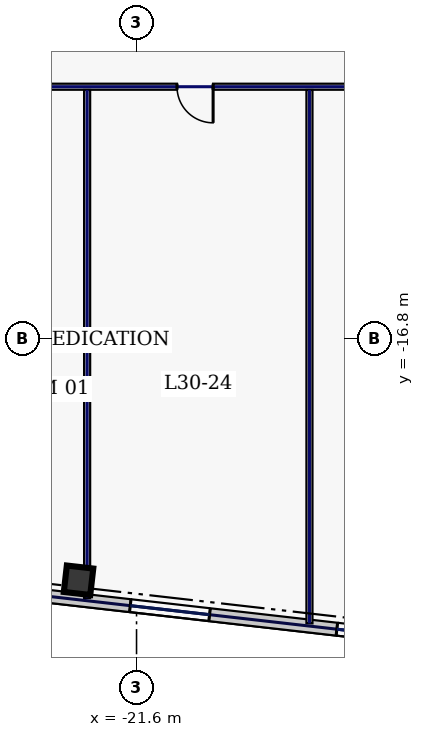
"""IFC4 building model, lengths in metres.
Left out: names, types, materials, properties, quantities, classifications, styles, units other than length and angle.
Written with IfcOpenShell. Run it as: python <this file> out.ifc"""

import sys

from ifc_helpers import new_model, si_unit, direction, frame, frame_2d, origin, origin_2d, place, context, subcontext, project, spatial, rectangle, hollow_rectangle, extrude, element, fill, save


model = new_model("IFC4")
c1 = context("Model", 3, precision=1e-05, world=origin(), true_north=direction((0.0, 1.0)))
c2 = subcontext(c1, "Body", "Model", "MODEL_VIEW")
j1 = project(units=[si_unit("LENGTHUNIT", "METRE"), si_unit("PLANEANGLEUNIT", "RADIAN")], contexts=[c1])
p1 = place(None, origin())
s1 = spatial("IfcSite", under=j1, at=p1, CompositionType="ELEMENT")
p2 = place(p1, origin())
s2 = spatial("IfcBuilding", under=s1, at=p2, CompositionType="ELEMENT")
p3 = place(p2, frame((0.0, 0.0, 133.4)))
s3 = spatial("IfcBuildingStorey", under=s2, at=p3, CompositionType="ELEMENT", Elevation=133.4)
p4 = place(p3, frame((-23.126, -23.168, 0.0), z_axis=(0.0, 0.0, 1.0), x_axis=(0.993571855677, -0.113203213768, 0.0)))
e1 = element("IfcColumn", 1, at=p4, inside=s3, PredefinedType="COLUMN", context=c2, shape_type="SweptSolid", body=[
    extrude(hollow_rectangle(XDim=0.7, YDim=0.7, WallThickness=0.032, at=origin_2d()), origin(), (0.0, 0.0, 1.0), 3.74),
])
p5 = place(p3, frame((-32.977, -22.559, 0.0), z_axis=(0.0, 0.0, 1.0), x_axis=(0.993571214605, -0.113208840243, 0.0)))
e2 = element("IfcWall", 2, at=p5, inside=s3, PredefinedType="STANDARD", context=c2, shape_type="SweptSolid", body=[
    extrude(rectangle(XDim=21.223, YDim=0.34, at=frame_2d((10.611, 0.0))), origin(), (0.0, 0.0, 1.0), 3.74),
])
p6 = place(p5, frame((2.108, 0.0, 0.67)))
e3 = element("IfcOpeningElement", 3, at=p6, cuts=e2, PredefinedType="OPENING", context=c2, shape_type="SweptSolid", body=[
    extrude(rectangle(XDim=2.1, YDim=2.2, at=frame_2d((1.05, 1.1))), frame((0.0, 0.18, 0.0), z_axis=(0.0, -1.0, 0.0), x_axis=(1.0, 0.0, 0.0)), (0.0, 0.0, 1.0), 0.36),
])
p7 = place(p5, frame((6.329, 0.0, 0.67)))
e4 = element("IfcOpeningElement", 4, at=p7, cuts=e2, PredefinedType="OPENING", context=c2, shape_type="SweptSolid", body=[
    extrude(rectangle(XDim=2.1, YDim=2.2, at=frame_2d((1.05, 1.1))), frame((0.0, 0.18, 0.0), z_axis=(0.0, -1.0, 0.0), x_axis=(1.0, 0.0, 0.0)), (0.0, 0.0, 1.0), 0.36),
])
p8 = place(p5, frame((11.285, 0.0, 0.67)))
e5 = element("IfcOpeningElement", 5, at=p8, cuts=e2, PredefinedType="OPENING", context=c2, shape_type="SweptSolid", body=[
    extrude(rectangle(XDim=2.1, YDim=2.2, at=frame_2d((1.05, 1.1))), frame((0.0, 0.18, 0.0), z_axis=(0.0, -1.0, 0.0), x_axis=(1.0, 0.0, 0.0)), (0.0, 0.0, 1.0), 0.36),
])
p9 = place(p5, frame((16.756, 0.0, 0.67)))
e6 = element("IfcOpeningElement", 6, at=p9, cuts=e2, PredefinedType="OPENING", context=c2, shape_type="SweptSolid", body=[
    extrude(rectangle(XDim=0.85, YDim=1.85, at=frame_2d((0.425, 0.925))), frame((0.0, 0.18, 0.0), z_axis=(0.0, -1.0, 0.0), x_axis=(1.0, 0.0, 0.0)), (0.0, 0.0, 1.0), 0.36),
])
p10 = place(p3, frame((27.465, -10.18, 0.0), z_axis=(0.0, 0.0, 1.0), x_axis=(-1.0, 0.0, 0.0)))
e7 = element("IfcWall", 7, at=p10, inside=s3, PredefinedType="PARTITIONING", context=c2, shape_type="SweptSolid", body=[
    extrude(rectangle(XDim=54.93, YDim=0.16, at=frame_2d((27.465, 0.0))), origin(), (0.0, 0.0, 1.0), 3.74),
])
p11 = place(p10, frame((52.106, 0.0, 0.0)))
e8 = element("IfcOpeningElement", 8, at=p11, cuts=e7, PredefinedType="OPENING", context=c2, shape_type="SweptSolid", body=[
    extrude(rectangle(XDim=0.95, YDim=2.2, at=frame_2d((0.475, 1.1))), frame((0.0, 0.09, 0.0), z_axis=(0.0, -1.0, 0.0), x_axis=(1.0, 0.0, 0.0)), (0.0, 0.0, 1.0), 0.18),
])
p12 = place(p10, frame((47.05, 0.0, 0.0)))
e9 = element("IfcOpeningElement", 9, at=p12, cuts=e7, PredefinedType="OPENING", context=c2, shape_type="SweptSolid", body=[
    extrude(rectangle(XDim=0.95, YDim=2.2, at=frame_2d((0.475, 1.1))), frame((0.0, 0.09, 0.0), z_axis=(0.0, -1.0, 0.0), x_axis=(1.0, 0.0, 0.0)), (0.0, 0.0, 1.0), 0.18),
])
p13 = place(p10, frame((41.65, 0.0, 0.0)))
e10 = element("IfcOpeningElement", 10, at=p13, cuts=e7, PredefinedType="OPENING", context=c2, shape_type="SweptSolid", body=[
    extrude(rectangle(XDim=0.95, YDim=2.2, at=frame_2d((0.475, 1.1))), frame((0.0, 0.09, 0.0), z_axis=(0.0, -1.0, 0.0), x_axis=(1.0, 0.0, 0.0)), (0.0, 0.0, 1.0), 0.18),
])
p14 = place(p10, frame((35.825, 0.0, 0.0)))
e11 = element("IfcOpeningElement", 11, at=p14, cuts=e7, PredefinedType="OPENING", context=c2, shape_type="SweptSolid", body=[
    extrude(rectangle(XDim=0.95, YDim=2.2, at=frame_2d((0.475, 1.1))), frame((0.0, 0.09, 0.0), z_axis=(0.0, -1.0, 0.0), x_axis=(1.0, 0.0, 0.0)), (0.0, 0.0, 1.0), 0.18),
])
p15 = place(p10, frame((29.575, 0.0, 0.0)))
e12 = element("IfcOpeningElement", 12, at=p15, cuts=e7, PredefinedType="OPENING", context=c2, shape_type="SweptSolid", body=[
    extrude(rectangle(XDim=0.95, YDim=2.2, at=frame_2d((0.475, 1.1))), frame((0.0, 0.09, 0.0), z_axis=(0.0, -1.0, 0.0), x_axis=(1.0, 0.0, 0.0)), (0.0, 0.0, 1.0), 0.18),
])
p16 = place(p10, frame((23.285, 0.0, 0.0)))
e13 = element("IfcOpeningElement", 13, at=p16, cuts=e7, PredefinedType="OPENING", context=c2, shape_type="SweptSolid", body=[
    extrude(rectangle(XDim=0.95, YDim=2.2, at=frame_2d((0.475, 1.1))), frame((0.0, 0.09, 0.0), z_axis=(0.0, -1.0, 0.0), x_axis=(1.0, 0.0, 0.0)), (0.0, 0.0, 1.0), 0.18),
])
p17 = place(p10, frame((16.78, 0.0, 0.0)))
e14 = element("IfcOpeningElement", 14, at=p17, cuts=e7, PredefinedType="OPENING", context=c2, shape_type="SweptSolid", body=[
    extrude(rectangle(XDim=1.3, YDim=2.2, at=frame_2d((0.65, 1.1))), frame((0.0, 0.09, 0.0), z_axis=(0.0, -1.0, 0.0), x_axis=(1.0, 0.0, 0.0)), (0.0, 0.0, 1.0), 0.18),
])
p18 = place(p10, frame((11.23, 0.0, 0.0)))
e15 = element("IfcOpeningElement", 15, at=p18, cuts=e7, PredefinedType="OPENING", context=c2, shape_type="SweptSolid", body=[
    extrude(rectangle(XDim=1.3, YDim=2.2, at=frame_2d((0.65, 1.1))), frame((0.0, 0.09, 0.0), z_axis=(0.0, -1.0, 0.0), x_axis=(1.0, 0.0, 0.0)), (0.0, 0.0, 1.0), 0.18),
])
p19 = place(p10, frame((6.46, 0.0, 0.0)))
e16 = element("IfcOpeningElement", 16, at=p19, cuts=e7, PredefinedType="OPENING", context=c2, shape_type="SweptSolid", body=[
    extrude(rectangle(XDim=1.3, YDim=2.2, at=frame_2d((0.65, 1.1))), frame((0.0, 0.09, 0.0), z_axis=(0.0, -1.0, 0.0), x_axis=(1.0, 0.0, 0.0)), (0.0, 0.0, 1.0), 0.18),
])
p20 = place(p10, frame((2.194, 0.0, 0.0)))
e17 = element("IfcOpeningElement", 17, at=p20, cuts=e7, PredefinedType="OPENING", context=c2, shape_type="SweptSolid", body=[
    extrude(rectangle(XDim=0.95, YDim=2.2, at=frame_2d((0.475, 1.1))), frame((0.0, 0.09, 0.0), z_axis=(0.0, -1.0, 0.0), x_axis=(1.0, 0.0, 0.0)), (0.0, 0.0, 1.0), 0.18),
])
p21 = place(p3, frame((-22.9, -23.636, 0.0), z_axis=(0.0, 0.0, 1.0), x_axis=(0.0, 1.0, 0.0)))
e18 = element("IfcWall", 18, at=p21, inside=s3, PredefinedType="PARTITIONING", context=c2, shape_type="SweptSolid", body=[
    extrude(rectangle(XDim=13.371, YDim=0.16, at=frame_2d((6.686, 0.0))), origin(), (0.0, 0.0, 1.0), 3.74),
])
p22 = place(p3, frame((-17.05, -24.303, 0.0), z_axis=(0.0, 0.0, 1.0), x_axis=(0.0, 1.0, 0.0)))
e19 = element("IfcWall", 19, at=p22, inside=s3, PredefinedType="PARTITIONING", context=c2, shape_type="SweptSolid", body=[
    extrude(rectangle(XDim=14.038, YDim=0.16, at=frame_2d((7.019, 0.0))), origin(), (0.0, 0.0, 1.0), 3.74),
])
p23 = place(p8, origin())
e20 = element("IfcWindow", 20, at=p23, inside=s3, PartitioningType="SINGLE_PANEL", PredefinedType="WINDOW", context=c2, shape_type="SweptSolid", body=[
    extrude(rectangle(XDim=2.1, YDim=2.2, at=frame_2d((1.05, 1.1))), frame((0.0, 0.03, 0.0), z_axis=(0.0, -1.0, 0.0), x_axis=(1.0, 0.0, 0.0)), (0.0, 0.0, 1.0), 0.06),
])
fill(e5, e20)
p24 = place(p9, origin())
e21 = element("IfcWindow", 21, at=p24, inside=s3, PartitioningType="SINGLE_PANEL", PredefinedType="WINDOW", context=c2, shape_type="SweptSolid", body=[
    extrude(rectangle(XDim=0.85, YDim=1.85, at=frame_2d((0.425, 0.925))), frame((0.0, 0.03, 0.0), z_axis=(0.0, -1.0, 0.0), x_axis=(1.0, 0.0, 0.0)), (0.0, 0.0, 1.0), 0.06),
])
fill(e6, e21)
p25 = place(p12, origin())
e22 = element("IfcDoor", 22, at=p25, inside=s3, OperationType="SINGLE_SWING_LEFT", PredefinedType="DOOR", context=c2, shape_type="SweptSolid", body=[
    extrude(rectangle(XDim=0.95, YDim=2.2, at=frame_2d((0.475, 1.1))), frame((0.0, 0.025, 0.0), z_axis=(0.0, -1.0, 0.0), x_axis=(1.0, 0.0, 0.0)), (0.0, 0.0, 1.0), 0.05),
])
fill(e9, e22)
save(model, sys.argv[1])
